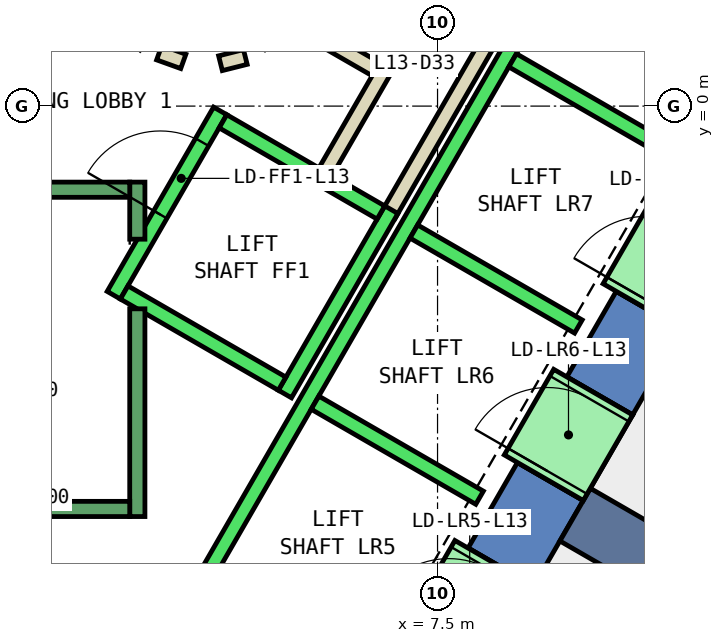
"""IFC4 building model, lengths in metres.
Left out: names, types, materials, properties, quantities, classifications, styles, units other than length and angle.
Written with IfcOpenShell. Run it as: python <this file> out.ifc"""

import sys

from ifc_helpers import new_model, si_unit, direction, frame, frame_2d, origin, place, context, subcontext, project, spatial, polyline, rectangle, outline, extrude, element, fill, save


model = new_model("IFC4")
c1 = context("Model", 3, precision=1e-05, world=origin(), true_north=direction((0.0, 1.0)))
c2 = subcontext(c1, "Body", "Model", "MODEL_VIEW")
j1 = project(units=[si_unit("LENGTHUNIT", "METRE"), si_unit("PLANEANGLEUNIT", "RADIAN")], contexts=[c1])
p1 = place(None, origin())
s1 = spatial("IfcSite", under=j1, at=p1, CompositionType="ELEMENT")
p2 = place(p1, origin())
s2 = spatial("IfcBuilding", under=s1, at=p2, CompositionType="ELEMENT")
p3 = place(p2, frame((0.0, 0.0, 64.4)))
s3 = spatial("IfcBuildingStorey", under=s2, at=p3, CompositionType="ELEMENT", Elevation=64.4)
p4 = place(p3, frame((0.0, 0.0, -0.4)))
e1 = element("IfcWall", 1, at=p4, inside=s3, PredefinedType="SHEAR", context=c2, shape_type="SweptSolid", body=[
    extrude(outline(polyline([(9.417, -5.189), (8.551, -4.689), (7.902, -5.814), (8.767, -6.314), (9.417, -5.189)])), origin(), (0.0, 0.0, 1.0), 4.2),
])
p5 = place(p3, frame((0.0, 0.0, -0.4)))
e2 = element("IfcWall", 2, at=p5, inside=s3, PredefinedType="SHEAR", context=c2, shape_type="SweptSolid", body=[
    extrude(outline(polyline([(10.717, -2.937), (9.851, -2.437), (9.201, -3.563), (10.067, -4.063), (10.717, -2.937)])), origin(), (0.0, 0.0, 1.0), 4.2),
])
p6 = place(p3, frame((0.0, 0.0, 3.6)))
e3 = element("IfcWall", 3, at=p6, inside=s3, PredefinedType="SHEAR", context=c2, shape_type="SweptSolid", body=[
    extrude(outline(polyline([(8.767, -6.314), (7.902, -5.814), (7.252, -6.94), (8.117, -7.44), (8.767, -6.314)])), origin(), (0.0, 0.0, 1.0), 0.2),
])
p7 = place(p3, frame((0.0, 0.0, 3.6)))
e4 = element("IfcWall", 4, at=p7, inside=s3, PredefinedType="SHEAR", context=c2, shape_type="SweptSolid", body=[
    extrude(outline(polyline([(10.067, -4.063), (9.201, -3.563), (8.551, -4.689), (9.417, -5.189), (10.067, -4.063)])), origin(), (0.0, 0.0, 1.0), 0.2),
])
p8 = place(p3, frame((0.0, 0.0, 3.6)))
e5 = element("IfcWall", 5, at=p8, inside=s3, PredefinedType="SHEAR", context=c2, shape_type="SweptSolid", body=[
    extrude(outline(polyline([(11.367, -1.811), (10.501, -1.311), (9.851, -2.437), (10.717, -2.937), (11.367, -1.811)])), origin(), (0.0, 0.0, 1.0), 0.2),
])
p9 = place(p3, frame((9.31, -5.375, -0.4), z_axis=(0.0, 0.0, 1.0), x_axis=(0.866017533419, -0.500013631625, 0.0)))
e6 = element("IfcWall", 6, at=p9, inside=s3, PredefinedType="SHEAR", context=c2, shape_type="SweptSolid", body=[
    extrude(rectangle(XDim=9.0, YDim=0.8, at=frame_2d((4.5, 0.0))), origin(), (0.0, 0.0, 1.0), 4.2),
])
p10 = place(p3, frame((5.499, 1.172, 0.0), z_axis=(0.0, 0.0, 1.0), x_axis=(0.866333505267, -0.499465972466, 0.0)))
e7 = element("IfcWall", 7, at=p10, inside=s3, PredefinedType="PARTITIONING", context=c2, shape_type="SweptSolid", body=[
    extrude(rectangle(XDim=1.374, YDim=0.2, at=frame_2d((0.687, 0.0))), origin(), (0.0, 0.0, 1.0), 3.8),
])
p11 = place(p3, frame((6.826, 0.522, 0.0), z_axis=(0.0, 0.0, 1.0), x_axis=(-0.500016722714, -0.866015748706, 0.0)))
e8 = element("IfcWall", 8, at=p11, inside=s3, PredefinedType="PARTITIONING", context=c2, shape_type="SweptSolid", body=[
    extrude(rectangle(XDim=1.7, YDim=0.2, at=frame_2d((0.85, 0.0))), origin(), (0.0, 0.0, 1.0), 3.8),
])
p12 = place(p3, frame((8.192, 0.888, 0.0), z_axis=(0.0, 0.0, 1.0), x_axis=(-0.499940625693, -0.866059680843, 0.0)))
e9 = element("IfcWall", 9, at=p12, inside=s3, PredefinedType="PARTITIONING", context=c2, shape_type="SweptSolid", body=[
    extrude(rectangle(XDim=2.68, YDim=0.2, at=frame_2d((1.34, 0.0))), origin(), (0.0, 0.0, 1.0), 3.8),
])
p13 = place(p3, frame((3.838, 0.702, 0.0), z_axis=(0.0, 0.0, 1.0), x_axis=(0.941035081519, -0.338308993895, 0.0)))
e10 = element("IfcWall", 10, at=p13, inside=s3, PredefinedType="PARTITIONING", context=c2, shape_type="SweptSolid", body=[
    extrude(rectangle(XDim=0.337, YDim=0.2, at=frame_2d((0.168, 0.0))), origin(), (0.0, 0.0, 1.0), 3.8),
])
p14 = place(p3, frame((4.644, 0.564, 0.0), z_axis=(0.0, 0.0, 1.0), x_axis=(0.969929076366, 0.243387729394, 0.0)))
e11 = element("IfcWall", 11, at=p14, inside=s3, PredefinedType="PARTITIONING", context=c2, shape_type="SweptSolid", body=[
    extrude(rectangle(XDim=0.337, YDim=0.2, at=frame_2d((0.168, 0.0))), origin(), (0.0, 0.0, 1.0), 3.8),
])
p15 = place(p3, frame((3.24, -2.488, 0.0), z_axis=(0.0, 0.0, 1.0), x_axis=(0.49994636267, 0.866056369097, 0.0)))
e12 = element("IfcWall", 12, at=p15, inside=s3, PredefinedType="STANDARD", context=c2, shape_type="SweptSolid", body=[
    extrude(rectangle(XDim=2.8, YDim=0.2, at=frame_2d((1.4, 0.0))), origin(), (0.0, 0.0, 1.0), 3.8),
])
p16 = place(p15, frame((1.225, 0.0, 0.0)))
e13 = element("IfcOpeningElement", 13, at=p16, cuts=e12, PredefinedType="OPENING", context=c2, shape_type="SweptSolid", body=[
    extrude(rectangle(XDim=1.1, YDim=2.1, at=frame_2d((0.55, 1.05))), frame((0.0, 0.11, 0.0), z_axis=(0.0, -1.0, 0.0), x_axis=(1.0, 0.0, 0.0)), (0.0, 0.0, 1.0), 0.22),
])
p17 = place(p3, frame((5.492, -3.788, 0.0), z_axis=(0.0, 0.0, 1.0), x_axis=(0.500011755427, 0.866018616679, 0.0)))
e14 = element("IfcWall", 14, at=p17, inside=s3, PredefinedType="STANDARD", context=c2, shape_type="SweptSolid", body=[
    extrude(rectangle(XDim=2.8, YDim=0.2, at=frame_2d((1.4, 0.0))), origin(), (0.0, 0.0, 1.0), 3.8),
])
p18 = place(p3, frame((3.377, -2.452, 0.0), z_axis=(0.0, 0.0, 1.0), x_axis=(0.865955154139, -0.50012165622, 0.0)))
e15 = element("IfcWall", 15, at=p18, inside=s3, PredefinedType="STANDARD", context=c2, shape_type="SweptSolid", body=[
    extrude(rectangle(XDim=2.4, YDim=0.2, at=frame_2d((1.2, 0.0))), origin(), (0.0, 0.0, 1.0), 3.8),
])
p19 = place(p3, frame((4.677, -0.2, 0.0), z_axis=(0.0, 0.0, 1.0), x_axis=(0.865973769406, -0.500089422704, 0.0)))
e16 = element("IfcWall", 16, at=p19, inside=s3, PredefinedType="STANDARD", context=c2, shape_type="SweptSolid", body=[
    extrude(rectangle(XDim=2.399, YDim=0.2, at=frame_2d((1.2, 0.0))), origin(), (0.0, 0.0, 1.0), 3.8),
])
p20 = place(p3, frame((4.451, -6.19, 0.0), z_axis=(0.0, 0.0, 1.0), x_axis=(0.50000090737, 0.866024879913, 0.0)))
e17 = element("IfcWall", 17, at=p20, inside=s3, PredefinedType="STANDARD", context=c2, shape_type="SweptSolid", body=[
    extrude(rectangle(XDim=10.6, YDim=0.2, at=frame_2d((5.3, 0.0))), origin(), (0.0, 0.0, 1.0), 3.8),
])
for number, where, z_axis, x_axis in (
    (18, (5.888, -3.902, 0.0), (0.0, 0.0, 1.0), (0.866, -0.5, 0.0)),
    (19, (7.188, -1.65, 0.0), (0.0, 0.0, 1.0), (0.866, -0.5, 0.0)),
    (20, (8.488, 0.602, 0.0), (0.0, 0.0, 1.0), (0.866, -0.5, 0.0)),
):
    element("IfcWall", number, at=place(p3, frame(where, z_axis=z_axis, x_axis=x_axis)), inside=s3, PredefinedType="STANDARD", context=c2, shape_type="SweptSolid", body=[
        extrude(rectangle(XDim=2.5, YDim=0.2, at=frame_2d((1.25, 0.0))), origin(), (0.0, 0.0, 1.0), 3.8),
    ])
p21 = place(p3, frame((7.598, -7.14, 0.0), z_axis=(0.0, 0.0, 1.0), x_axis=(0.500362116554, 0.865816234728, 0.0)))
e21 = element("IfcWall", 21, at=p21, inside=s3, PredefinedType="STANDARD", context=c2, shape_type="SweptSolid", body=[
    extrude(rectangle(XDim=1.299, YDim=1.2, at=frame_2d((0.65, 0.0))), origin(), (0.0, 0.0, 1.0), 2.4),
])
p22 = place(p21, frame((0.1, 0.0, 0.0)))
e22 = element("IfcOpeningElement", 22, at=p22, cuts=e21, PredefinedType="OPENING", context=c2, shape_type="SweptSolid", body=[
    extrude(rectangle(XDim=1.1, YDim=2.3, at=frame_2d((0.55, 1.15))), frame((0.0, 0.61, 0.0), z_axis=(0.0, -1.0, 0.0), x_axis=(1.0, 0.0, 0.0)), (0.0, 0.0, 1.0), 1.22),
])
p23 = place(p3, frame((8.898, -4.889, 0.0), z_axis=(0.0, 0.0, 1.0), x_axis=(0.500036693733, 0.866004217611, 0.0)))
e23 = element("IfcWall", 23, at=p23, inside=s3, PredefinedType="STANDARD", context=c2, shape_type="SweptSolid", body=[
    extrude(rectangle(XDim=1.3, YDim=1.2, at=frame_2d((0.65, 0.0))), origin(), (0.0, 0.0, 1.0), 2.4),
])
p24 = place(p23, frame((0.1, 0.0, 0.0)))
e24 = element("IfcOpeningElement", 24, at=p24, cuts=e23, PredefinedType="OPENING", context=c2, shape_type="SweptSolid", body=[
    extrude(rectangle(XDim=1.1, YDim=2.3, at=frame_2d((0.55, 1.15))), frame((0.0, 0.61, 0.0), z_axis=(0.0, -1.0, 0.0), x_axis=(1.0, 0.0, 0.0)), (0.0, 0.0, 1.0), 1.22),
])
p25 = place(p3, frame((10.198, -2.637, 0.0), z_axis=(0.0, 0.0, 1.0), x_axis=(0.49989585183, 0.866085525409, 0.0)))
e25 = element("IfcWall", 25, at=p25, inside=s3, PredefinedType="STANDARD", context=c2, shape_type="SweptSolid", body=[
    extrude(rectangle(XDim=1.3, YDim=1.2, at=frame_2d((0.65, 0.0))), origin(), (0.0, 0.0, 1.0), 2.4),
])
p26 = place(p25, frame((0.1, 0.0, 0.0)))
e26 = element("IfcOpeningElement", 26, at=p26, cuts=e25, PredefinedType="OPENING", context=c2, shape_type="SweptSolid", body=[
    extrude(rectangle(XDim=1.1, YDim=2.3, at=frame_2d((0.55, 1.15))), frame((0.0, 0.61, 0.0), z_axis=(0.0, -1.0, 0.0), x_axis=(1.0, 0.0, 0.0)), (0.0, 0.0, 1.0), 1.22),
])
p27 = place(p3, frame((3.55, -2.667, 0.0), z_axis=(0.0, 0.0, 1.0), x_axis=(0.0, -1.0, 0.0)))
e27 = element("IfcWall", 27, at=p27, inside=s3, PredefinedType="STANDARD", context=c2, shape_type="SweptSolid", body=[
    extrude(rectangle(XDim=2.733, YDim=0.2, at=frame_2d((1.366, 0.0))), origin(), (0.0, 0.0, 1.0), 3.8),
])
p28 = place(p3, frame((3.55, -1.0, 0.0), z_axis=(0.0, 0.0, 1.0), x_axis=(0.0, -1.0, 0.0)))
e28 = element("IfcWall", 28, at=p28, inside=s3, PredefinedType="STANDARD", context=c2, shape_type="SweptSolid", body=[
    extrude(rectangle(XDim=0.751, YDim=0.2, at=frame_2d((0.375, 0.0))), origin(), (0.0, 0.0, 1.0), 3.8),
])
p29 = place(p3, frame((-3.45, -1.1, 0.0), z_axis=(0.0, 0.0, 1.0), x_axis=(1.0, 0.0, 0.0)))
e29 = element("IfcWall", 29, at=p29, inside=s3, PredefinedType="STANDARD", context=c2, shape_type="SweptSolid", body=[
    extrude(rectangle(XDim=6.9, YDim=0.2, at=frame_2d((3.45, 0.0))), origin(), (0.0, 0.0, 1.0), 3.8),
])
p30 = place(p29, frame((0.45, 0.0, 0.0)))
e30 = element("IfcOpeningElement", 30, at=p30, cuts=e29, PredefinedType="OPENING", context=c2, shape_type="SweptSolid", body=[
    extrude(rectangle(XDim=1.1, YDim=2.2, at=frame_2d((0.55, 1.1))), frame((0.0, 0.11, 0.0), z_axis=(0.0, -1.0, 0.0), x_axis=(1.0, 0.0, 0.0)), (0.0, 0.0, 1.0), 0.22),
])
p31 = place(p3, frame((-3.45, -5.3, 0.0), z_axis=(0.0, 0.0, 1.0), x_axis=(1.0, 0.0, 0.0)))
e31 = element("IfcWall", 31, at=p31, inside=s3, PredefinedType="STANDARD", context=c2, shape_type="SweptSolid", body=[
    extrude(rectangle(XDim=6.9, YDim=0.2, at=frame_2d((3.45, 0.0))), origin(), (0.0, 0.0, 1.0), 3.8),
])
p32 = place(p24, origin())
e32 = element("IfcDoor", 32, at=p32, inside=s3, OperationType="SLIDING_TO_LEFT", PredefinedType="DOOR", context=c2, shape_type="SweptSolid", body=[
    extrude(rectangle(XDim=1.1, YDim=2.3, at=frame_2d((0.55, 1.15))), frame((0.0, 0.025, 0.0), z_axis=(0.0, -1.0, 0.0), x_axis=(1.0, 0.0, 0.0)), (0.0, 0.0, 1.0), 0.05),
])
fill(e24, e32)
p33 = place(p16, origin())
e33 = element("IfcDoor", 33, at=p33, inside=s3, OperationType="SLIDING_TO_LEFT", PredefinedType="DOOR", context=c2, shape_type="SweptSolid", body=[
    extrude(rectangle(XDim=1.1, YDim=2.1, at=frame_2d((0.55, 1.05))), frame((0.0, 0.025, 0.0), z_axis=(0.0, -1.0, 0.0), x_axis=(1.0, 0.0, 0.0)), (0.0, 0.0, 1.0), 0.05),
])
fill(e13, e33)
save(model, sys.argv[1])
